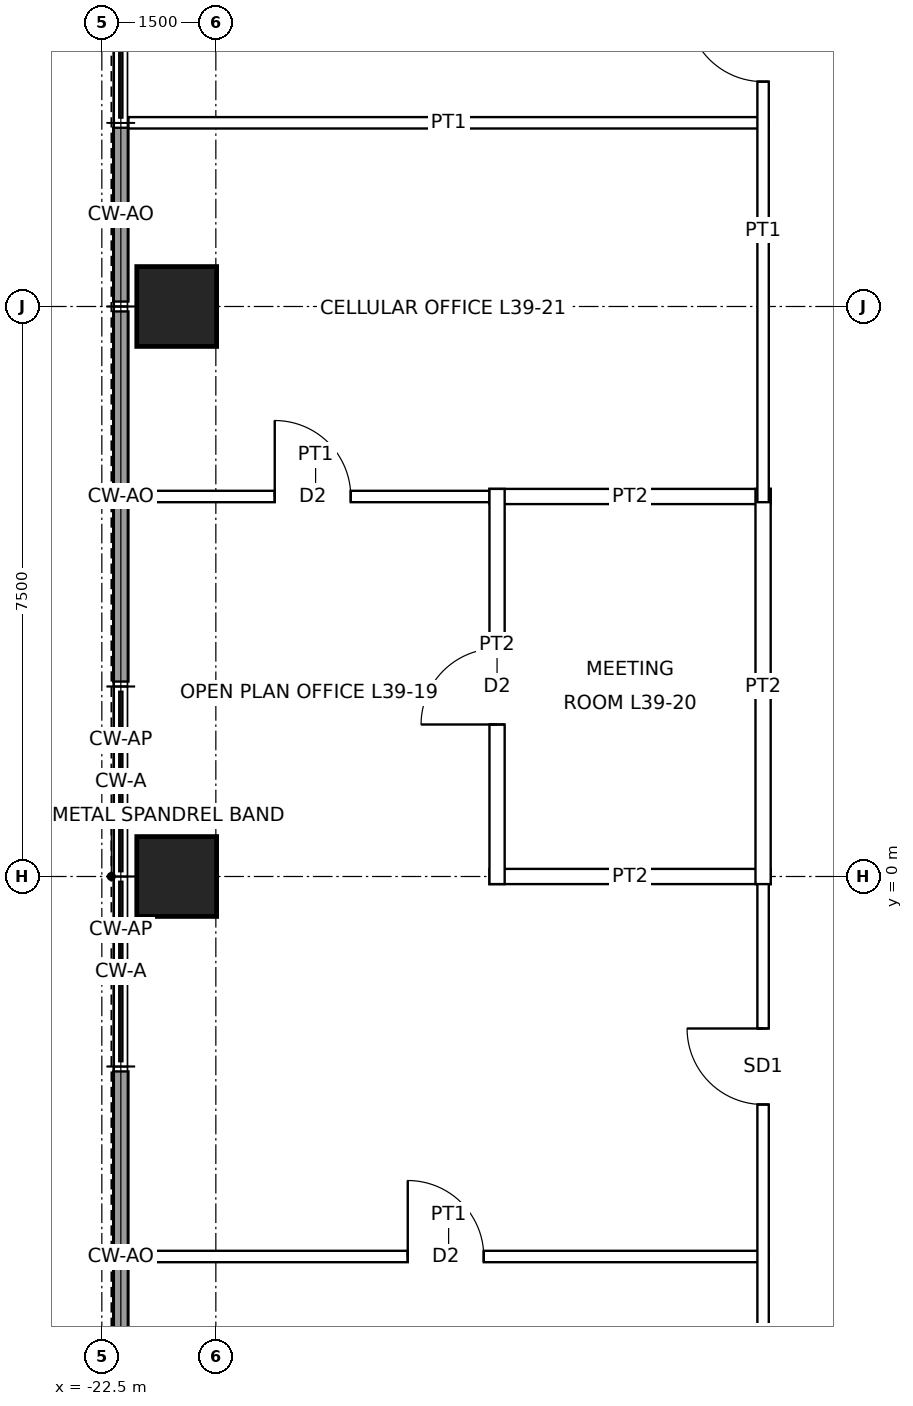
"""IFC4 building model, lengths in metres.
Left out: names, types, materials, properties, quantities, classifications, styles, units other than length and angle.
Written with IfcOpenShell. Run it as: python <this file> out.ifc"""

import sys

from ifc_helpers import new_model, si_unit, direction, frame, frame_2d, origin, origin_2d, place, context, subcontext, project, spatial, rectangle, hollow_rectangle, extrude, element, fill, save


model = new_model("IFC4")
c1 = context("Model", 3, precision=1e-05, world=origin(), true_north=direction((0.0, 1.0)))
c2 = subcontext(c1, "Body", "Model", "MODEL_VIEW")
j1 = project(units=[si_unit("LENGTHUNIT", "METRE"), si_unit("PLANEANGLEUNIT", "RADIAN")], contexts=[c1])
p1 = place(None, origin())
s1 = spatial("IfcSite", under=j1, at=p1, CompositionType="ELEMENT")
p2 = place(p1, origin())
s2 = spatial("IfcBuilding", under=s1, at=p2, CompositionType="ELEMENT")
p3 = place(p2, frame((0.0, 0.0, 189.9)))
s3 = spatial("IfcBuildingStorey", under=s2, at=p3, CompositionType="ELEMENT", Elevation=189.9)
for number, where, z_axis, x_axis in (
    (1, (-21.515, 0.0, 0.0), (0.0, 0.0, 1.0), (1.0, 0.0, 0.0)),
    (2, (-21.515, 7.5, 0.0), (0.0, 0.0, 1.0), (1.0, 0.0, 0.0)),
):
    element("IfcColumn", number, at=place(p3, frame(where, z_axis=z_axis, x_axis=x_axis)), inside=s3, PredefinedType="COLUMN", context=c2, shape_type="SweptSolid", body=[
        extrude(hollow_rectangle(XDim=1.05, YDim=1.05, WallThickness=0.07, at=origin_2d()), origin(), (0.0, 0.0, 1.0), 4.0),
    ])
for number, where, z_axis, x_axis in (
    (3, (-22.25, -7.435, 0.0), (0.0, 0.0, 1.0), (0.0, 1.0, 0.0)),
    (4, (-22.25, -4.968, 0.0), (0.0, 0.0, 1.0), (0.0, 1.0, 0.0)),
    (5, (-22.25, 2.565, 0.0), (0.0, 0.0, 1.0), (0.0, 1.0, 0.0)),
    (6, (-22.25, 5.032, 0.0), (0.0, 0.0, 1.0), (0.0, 1.0, 0.0)),
):
    element("IfcWall", number, at=place(p3, frame(where, z_axis=z_axis, x_axis=x_axis)), inside=s3, PredefinedType="SOLIDWALL", context=c2, shape_type="SweptSolid", body=[
        extrude(rectangle(XDim=2.403, YDim=0.2, at=frame_2d((1.201, 0.0))), origin(), (0.0, 0.0, 1.0), 3.85),
    ])
p4 = place(p3, frame((-22.25, 7.565, 0.0), z_axis=(0.0, 0.0, 1.0), x_axis=(0.0, 1.0, 0.0)))
e7 = element("IfcWall", 7, at=p4, inside=s3, PredefinedType="SOLIDWALL", context=c2, shape_type="SweptSolid", body=[
    extrude(rectangle(XDim=2.287, YDim=0.2, at=frame_2d((1.144, 0.0))), origin(), (0.0, 0.0, 1.0), 3.85),
])
p5 = place(p3, frame((-22.15, -5.0, 0.0), z_axis=(0.0, 0.0, 1.0), x_axis=(1.0, 0.0, 0.0)))
e8 = element("IfcWall", 8, at=p5, inside=s3, PredefinedType="PARTITIONING", context=c2, shape_type="SweptSolid", body=[
    extrude(rectangle(XDim=8.425, YDim=0.15, at=frame_2d((4.212, 0.0))), origin(), (0.0, 0.0, 1.0), 3.85),
])
p6 = place(p5, frame((3.675, 0.0, 0.0)))
e9 = element("IfcOpeningElement", 9, at=p6, cuts=e8, PredefinedType="OPENING", context=c2, shape_type="SweptSolid", body=[
    extrude(rectangle(XDim=1.0, YDim=2.1, at=frame_2d((0.5, 1.05))), frame((0.0, 0.085, 0.0), z_axis=(0.0, -1.0, 0.0), x_axis=(1.0, 0.0, 0.0)), (0.0, 0.0, 1.0), 0.17),
])
p7 = place(p3, frame((-17.4, 0.0, 0.0), z_axis=(0.0, 0.0, 1.0), x_axis=(1.0, 0.0, 0.0)))
e10 = element("IfcWall", 10, at=p7, inside=s3, PredefinedType="PARTITIONING", context=c2, shape_type="SweptSolid", body=[
    extrude(rectangle(XDim=3.7, YDim=0.2, at=frame_2d((1.85, 0.0))), origin(), (0.0, 0.0, 1.0), 3.238),
])
p8 = place(p3, frame((-22.15, 5.0, 0.0), z_axis=(0.0, 0.0, 1.0), x_axis=(1.0, 0.0, 0.0)))
e11 = element("IfcWall", 11, at=p8, inside=s3, PredefinedType="PARTITIONING", context=c2, shape_type="SweptSolid", body=[
    extrude(rectangle(XDim=4.925, YDim=0.15, at=frame_2d((2.462, 0.0))), origin(), (0.0, 0.0, 1.0), 3.85),
])
p9 = place(p8, frame((1.925, 0.0, 0.0)))
e12 = element("IfcOpeningElement", 12, at=p9, cuts=e11, PredefinedType="OPENING", context=c2, shape_type="SweptSolid", body=[
    extrude(rectangle(XDim=1.0, YDim=2.1, at=frame_2d((0.5, 1.05))), frame((0.0, 0.085, 0.0), z_axis=(0.0, -1.0, 0.0), x_axis=(1.0, 0.0, 0.0)), (0.0, 0.0, 1.0), 0.17),
])
p10 = place(p3, frame((-17.4, 5.0, 0.0), z_axis=(0.0, 0.0, 1.0), x_axis=(1.0, 0.0, 0.0)))
e13 = element("IfcWall", 13, at=p10, inside=s3, PredefinedType="PARTITIONING", context=c2, shape_type="SweptSolid", body=[
    extrude(rectangle(XDim=3.7, YDim=0.2, at=frame_2d((1.85, 0.0))), origin(), (0.0, 0.0, 1.0), 3.85),
])
p11 = place(p3, frame((-22.15, 9.917, 0.0), z_axis=(0.0, 0.0, 1.0), x_axis=(1.0, 0.0, 0.0)))
e14 = element("IfcWall", 14, at=p11, inside=s3, PredefinedType="PARTITIONING", context=c2, shape_type="SweptSolid", body=[
    extrude(rectangle(XDim=8.425, YDim=0.15, at=frame_2d((4.212, 0.0))), origin(), (0.0, 0.0, 1.0), 3.85),
])
p12 = place(p3, frame((-17.3, -0.1, 0.0), z_axis=(0.0, 0.0, 1.0), x_axis=(0.0, 1.0, 0.0)))
e15 = element("IfcWall", 15, at=p12, inside=s3, PredefinedType="PARTITIONING", context=c2, shape_type="SweptSolid", body=[
    extrude(rectangle(XDim=5.2, YDim=0.2, at=frame_2d((2.6, 0.0))), origin(), (0.0, 0.0, 1.0), 3.85),
])
p13 = place(p12, frame((2.1, 0.0, 0.0)))
e16 = element("IfcOpeningElement", 16, at=p13, cuts=e15, PredefinedType="OPENING", context=c2, shape_type="SweptSolid", body=[
    extrude(rectangle(XDim=1.0, YDim=2.1, at=frame_2d((0.5, 1.05))), frame((0.0, 0.11, 0.0), z_axis=(0.0, -1.0, 0.0), x_axis=(1.0, 0.0, 0.0)), (0.0, 0.0, 1.0), 0.22),
])
p14 = place(p3, frame((-13.8, -13.875, 0.0), z_axis=(0.0, 0.0, 1.0), x_axis=(0.0, 1.0, 0.0)))
e17 = element("IfcWall", 17, at=p14, inside=s3, PredefinedType="PARTITIONING", context=c2, shape_type="SweptSolid", body=[
    extrude(rectangle(XDim=13.95, YDim=0.15, at=frame_2d((6.975, 0.0))), origin(), (0.0, 0.0, 1.0), 3.85),
])
p15 = place(p14, frame((10.875, 0.0, 0.0)))
e18 = element("IfcOpeningElement", 18, at=p15, cuts=e17, PredefinedType="OPENING", context=c2, shape_type="SweptSolid", body=[
    extrude(rectangle(XDim=1.0, YDim=2.4, at=frame_2d((0.5, 1.2))), frame((0.0, 0.085, 0.0), z_axis=(0.0, -1.0, 0.0), x_axis=(1.0, 0.0, 0.0)), (0.0, 0.0, 1.0), 0.17),
])
p16 = place(p3, frame((-13.8, -0.1, 0.0), z_axis=(0.0, 0.0, 1.0), x_axis=(0.0, 1.0, 0.0)))
e19 = element("IfcWall", 19, at=p16, inside=s3, PredefinedType="PARTITIONING", context=c2, shape_type="SweptSolid", body=[
    extrude(rectangle(XDim=5.2, YDim=0.2, at=frame_2d((2.6, 0.0))), origin(), (0.0, 0.0, 1.0), 3.85),
])
p17 = place(p3, frame((-13.8, 4.925, 0.0), z_axis=(0.0, 0.0, 1.0), x_axis=(0.0, 1.0, 0.0)))
e20 = element("IfcWall", 20, at=p17, inside=s3, PredefinedType="PARTITIONING", context=c2, shape_type="SweptSolid", body=[
    extrude(rectangle(XDim=7.15, YDim=0.15, at=frame_2d((3.575, 0.0))), origin(), (0.0, 0.0, 1.0), 3.85),
])
p18 = place(p17, frame((5.533, 0.0, 0.0)))
e21 = element("IfcOpeningElement", 21, at=p18, cuts=e20, PredefinedType="OPENING", context=c2, shape_type="SweptSolid", body=[
    extrude(rectangle(XDim=1.0, YDim=2.4, at=frame_2d((0.5, 1.2))), frame((0.0, 0.085, 0.0), z_axis=(0.0, -1.0, 0.0), x_axis=(1.0, 0.0, 0.0)), (0.0, 0.0, 1.0), 0.17),
])
p19 = place(p6, origin())
e22 = element("IfcDoor", 22, at=p19, inside=s3, OperationType="SINGLE_SWING_LEFT", PredefinedType="DOOR", context=c2, shape_type="SweptSolid", body=[
    extrude(rectangle(XDim=1.0, YDim=2.1, at=frame_2d((0.5, 1.05))), frame((0.0, 0.025, 0.0), z_axis=(0.0, -1.0, 0.0), x_axis=(1.0, 0.0, 0.0)), (0.0, 0.0, 1.0), 0.05),
])
fill(e9, e22)
p20 = place(p15, origin())
e23 = element("IfcDoor", 23, at=p20, inside=s3, OperationType="SINGLE_SWING_RIGHT", PredefinedType="DOOR", context=c2, shape_type="SweptSolid", body=[
    extrude(rectangle(XDim=1.0, YDim=2.4, at=frame_2d((0.5, 1.2))), frame((0.0, 0.025, 0.0), z_axis=(0.0, -1.0, 0.0), x_axis=(1.0, 0.0, 0.0)), (0.0, 0.0, 1.0), 0.05),
])
fill(e18, e23)
p21 = place(p13, origin())
e24 = element("IfcDoor", 24, at=p21, inside=s3, OperationType="SINGLE_SWING_LEFT", PredefinedType="DOOR", context=c2, shape_type="SweptSolid", body=[
    extrude(rectangle(XDim=1.0, YDim=2.1, at=frame_2d((0.5, 1.05))), frame((0.0, 0.025, 0.0), z_axis=(0.0, -1.0, 0.0), x_axis=(1.0, 0.0, 0.0)), (0.0, 0.0, 1.0), 0.05),
])
fill(e16, e24)
p22 = place(p9, origin())
e25 = element("IfcDoor", 25, at=p22, inside=s3, OperationType="SINGLE_SWING_LEFT", PredefinedType="DOOR", context=c2, shape_type="SweptSolid", body=[
    extrude(rectangle(XDim=1.0, YDim=2.1, at=frame_2d((0.5, 1.05))), frame((0.0, 0.025, 0.0), z_axis=(0.0, -1.0, 0.0), x_axis=(1.0, 0.0, 0.0)), (0.0, 0.0, 1.0), 0.05),
])
fill(e12, e25)
p23 = place(p18, origin())
e26 = element("IfcDoor", 26, at=p23, inside=s3, OperationType="SINGLE_SWING_RIGHT", PredefinedType="DOOR", context=c2, shape_type="SweptSolid", body=[
    extrude(rectangle(XDim=1.0, YDim=2.4, at=frame_2d((0.5, 1.2))), frame((0.0, 0.025, 0.0), z_axis=(0.0, -1.0, 0.0), x_axis=(1.0, 0.0, 0.0)), (0.0, 0.0, 1.0), 0.05),
])
fill(e21, e26)
save(model, sys.argv[1])
